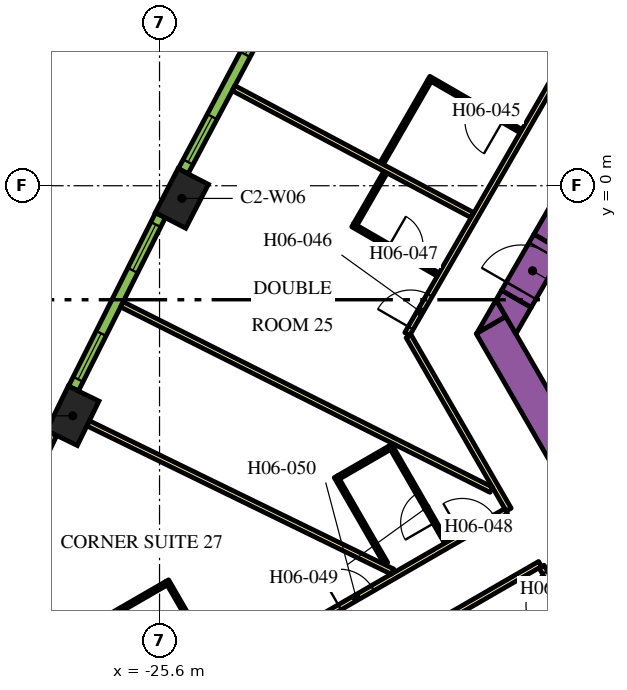
"""IFC4 building model, lengths in metres.
Left out: names, types, materials, properties, quantities, classifications, styles, units other than length and angle.
Written with IfcOpenShell. Run it as: python <this file> out.ifc"""

import sys

from ifc_helpers import new_model, si_unit, direction, frame, frame_2d, origin, origin_2d, place, context, subcontext, project, spatial, polyline, rectangle, outline, extrude, element, fill, save


model = new_model("IFC4")
c1 = context("Model", 3, precision=1e-05, world=origin(), true_north=direction((0.0, 1.0)))
c2 = subcontext(c1, "Body", "Model", "MODEL_VIEW")
j1 = project(units=[si_unit("LENGTHUNIT", "METRE"), si_unit("PLANEANGLEUNIT", "RADIAN")], contexts=[c1])
p1 = place(None, origin())
s1 = spatial("IfcSite", under=j1, at=p1, CompositionType="ELEMENT")
p2 = place(p1, origin())
s2 = spatial("IfcBuilding", under=s1, at=p2, CompositionType="ELEMENT")
p3 = place(p2, frame((0.0, 0.0, 91.5)))
s3 = spatial("IfcBuildingStorey", under=s2, at=p3, CompositionType="ELEMENT", Elevation=91.5)
for number, where, z_axis, x_axis in (
    (1, (-25.012, -0.334, 0.0), (0.0, 0.0, 1.0), (-0.459, -0.888, 0.0)),
    (2, (-27.883, -6.054, 0.0), (0.0, 0.0, 1.0), (-0.438, -0.899, 0.0)),
):
    element("IfcColumn", number, at=place(p3, frame(where, z_axis=z_axis, x_axis=x_axis)), inside=s3, PredefinedType="COLUMN", context=c2, shape_type="SweptSolid", body=[
        extrude(rectangle(XDim=1.3, YDim=0.9, at=origin_2d()), origin(), (0.0, 0.0, 1.0), 3.9),
    ])
p4 = place(p3, frame((-15.36, -1.503, 0.0), z_axis=(0.0, 0.0, 1.0), x_axis=(0.50000389221, 0.866023156604, 0.0)))
e3 = element("IfcWall", 3, at=p4, inside=s3, PredefinedType="SOLIDWALL", context=c2, shape_type="SweptSolid", body=[
    extrude(rectangle(XDim=21.0, YDim=0.9, at=frame_2d((10.5, 0.0))), origin(), (0.0, 0.0, 1.0), 3.9),
])
p5 = place(p3, frame((-12.134, -11.883, 0.0), z_axis=(0.0, 0.0, 1.0), x_axis=(-0.500005339912, 0.866022320763, 0.0)))
e4 = element("IfcWall", 4, at=p5, inside=s3, PredefinedType="SOLIDWALL", context=c2, shape_type="SweptSolid", body=[
    extrude(rectangle(XDim=9.488, YDim=0.9, at=frame_2d((4.744, 0.0))), origin(), (0.0, 0.0, 1.0), 3.9),
])
p6 = place(p3, origin())
e5 = element("IfcWall", 5, at=p6, inside=s3, PredefinedType="SOLIDWALL", context=c2, shape_type="SweptSolid", body=[
    extrude(outline(polyline([(-16.489, -3.44), (-17.251, -3.88), (-16.743, -3.0), (-16.489, -3.44)])), origin(), (0.0, 0.0, 1.0), 3.9),
])
e6 = element("IfcWall", 6, at=p6, inside=s3, PredefinedType="SOLIDWALL", context=c2, shape_type="SweptSolid", body=[
    extrude(outline(polyline([(-15.82, -3.201), (-16.223, -3.9), (-16.743, -3.0), (-16.599, -2.751), (-15.82, -3.201)])), origin(), (0.0, 0.0, 1.0), 3.9),
])
p7 = place(p3, frame((-16.209, -2.976, 0.0), z_axis=(0.0, 0.0, 1.0), x_axis=(0.499954529098, 0.86605165483, 0.0)))
e7 = element("IfcWall", 7, at=p7, inside=s3, PredefinedType="SOLIDWALL", context=c2, shape_type="SweptSolid", body=[
    extrude(rectangle(XDim=1.7, YDim=0.9, at=frame_2d((0.85, 0.0))), origin(), (0.0, 0.0, 1.0), 3.9),
])
p8 = place(p7, frame((0.25, 0.0, 0.0)))
e8 = element("IfcOpeningElement", 8, at=p8, cuts=e7, PredefinedType="OPENING", context=c2, shape_type="SweptSolid", body=[
    extrude(rectangle(XDim=1.2, YDim=2.1, at=frame_2d((0.6, 1.05))), frame((0.0, 0.46, 0.0), z_axis=(0.0, -1.0, 0.0), x_axis=(1.0, 0.0, 0.0)), (0.0, 0.0, 1.0), 0.92),
])
p9 = place(p3, frame((-19.081, -3.9, 0.0), z_axis=(0.0, 0.0, 1.0), x_axis=(0.499998313975, 0.866026377209, 0.0)))
e9 = element("IfcWall", 9, at=p9, inside=s3, PredefinedType="PARTITIONING", context=c2, shape_type="SweptSolid", body=[
    extrude(rectangle(XDim=25.766, YDim=0.15, at=frame_2d((12.883, 0.0))), origin(), (0.0, 0.0, 1.0), 2.75),
])
p10 = place(p9, frame((19.306, 0.0, 0.0)))
e10 = element("IfcOpeningElement", 10, at=p10, cuts=e9, PredefinedType="OPENING", context=c2, shape_type="SweptSolid", body=[
    extrude(rectangle(XDim=1.0, YDim=2.1, at=frame_2d((0.5, 1.05))), frame((0.0, 0.085, 0.0), z_axis=(0.0, -1.0, 0.0), x_axis=(1.0, 0.0, 0.0)), (0.0, 0.0, 1.0), 0.17),
])
p11 = place(p9, frame((18.0, 0.0, 0.0)))
e11 = element("IfcOpeningElement", 11, at=p11, cuts=e9, PredefinedType="OPENING", context=c2, shape_type="SweptSolid", body=[
    extrude(rectangle(XDim=1.0, YDim=2.1, at=frame_2d((0.5, 1.05))), frame((0.0, 0.085, 0.0), z_axis=(0.0, -1.0, 0.0), x_axis=(1.0, 0.0, 0.0)), (0.0, 0.0, 1.0), 0.17),
])
p12 = place(p9, frame((10.874, 0.0, 0.0)))
e12 = element("IfcOpeningElement", 12, at=p12, cuts=e9, PredefinedType="OPENING", context=c2, shape_type="SweptSolid", body=[
    extrude(rectangle(XDim=0.9, YDim=2.1, at=frame_2d((0.45, 1.05))), frame((0.0, 0.085, 0.0), z_axis=(0.0, -1.0, 0.0), x_axis=(1.0, 0.0, 0.0)), (0.0, 0.0, 1.0), 0.17),
])
p13 = place(p9, frame((8.548, 0.0, 0.0)))
e13 = element("IfcOpeningElement", 13, at=p13, cuts=e9, PredefinedType="OPENING", context=c2, shape_type="SweptSolid", body=[
    extrude(rectangle(XDim=1.1, YDim=2.1, at=frame_2d((0.55, 1.05))), frame((0.0, 0.085, 0.0), z_axis=(0.0, -1.0, 0.0), x_axis=(1.0, 0.0, 0.0)), (0.0, 0.0, 1.0), 0.17),
])
p14 = place(p9, frame((0.18, 0.0, 0.0)))
e14 = element("IfcOpeningElement", 14, at=p14, cuts=e9, PredefinedType="OPENING", context=c2, shape_type="SweptSolid", body=[
    extrude(rectangle(XDim=1.0, YDim=2.1, at=frame_2d((0.5, 1.05))), frame((0.0, 0.085, 0.0), z_axis=(0.0, -1.0, 0.0), x_axis=(1.0, 0.0, 0.0)), (0.0, 0.0, 1.0), 0.17),
])
p15 = place(p3, frame((-16.412, -8.523, 0.0), z_axis=(0.0, 0.0, 1.0), x_axis=(-0.500001929737, 0.866024289647, 0.0)))
e15 = element("IfcWall", 15, at=p15, inside=s3, PredefinedType="PARTITIONING", context=c2, shape_type="SweptSolid", body=[
    extrude(rectangle(XDim=5.268, YDim=0.15, at=frame_2d((2.634, 0.0))), origin(), (0.0, 0.0, 1.0), 2.75),
])
p16 = place(p3, frame((-28.211, -15.335, 0.0), z_axis=(0.0, 0.0, 1.0), x_axis=(0.866025884867, 0.49999916674, 0.0)))
e16 = element("IfcWall", 16, at=p16, inside=s3, PredefinedType="PARTITIONING", context=c2, shape_type="SweptSolid", body=[
    extrude(rectangle(XDim=13.543, YDim=0.15, at=frame_2d((6.772, 0.0))), origin(), (0.0, 0.0, 1.0), 2.75),
])
p17 = place(p16, frame((12.214, 0.0, 0.0)))
e17 = element("IfcOpeningElement", 17, at=p17, cuts=e16, PredefinedType="OPENING", context=c2, shape_type="SweptSolid", body=[
    extrude(rectangle(XDim=1.0, YDim=2.1, at=frame_2d((0.5, 1.05))), frame((0.0, 0.085, 0.0), z_axis=(0.0, -1.0, 0.0), x_axis=(1.0, 0.0, 0.0)), (0.0, 0.0, 1.0), 0.17),
])
p18 = place(p16, frame((8.488, 0.0, 0.0)))
e18 = element("IfcOpeningElement", 18, at=p18, cuts=e16, PredefinedType="OPENING", context=c2, shape_type="SweptSolid", body=[
    extrude(rectangle(XDim=1.0, YDim=2.1, at=frame_2d((0.5, 1.05))), frame((0.0, 0.085, 0.0), z_axis=(0.0, -1.0, 0.0), x_axis=(1.0, 0.0, 0.0)), (0.0, 0.0, 1.0), 0.17),
])
p19 = place(p3, frame((-15.587, -9.952, 0.0), z_axis=(0.0, 0.0, 1.0), x_axis=(-0.866017869832, -0.500013048961, 0.0)))
e19 = element("IfcWall", 19, at=p19, inside=s3, PredefinedType="PARTITIONING", context=c2, shape_type="SweptSolid", body=[
    extrude(rectangle(XDim=13.624, YDim=0.15, at=frame_2d((6.812, 0.0))), origin(), (0.0, 0.0, 1.0), 2.75),
])
p20 = place(p19, frame((4.134, 0.0, 0.0)))
e20 = element("IfcOpeningElement", 20, at=p20, cuts=e19, PredefinedType="OPENING", context=c2, shape_type="SweptSolid", body=[
    extrude(rectangle(XDim=1.0, YDim=2.1, at=frame_2d((0.5, 1.05))), frame((0.0, 0.085, 0.0), z_axis=(0.0, -1.0, 0.0), x_axis=(1.0, 0.0, 0.0)), (0.0, 0.0, 1.0), 0.17),
])
p21 = place(p3, frame((-12.918, -14.575, 0.0), z_axis=(0.0, 0.0, 1.0), x_axis=(-0.500009150678, 0.866020120573, 0.0)))
e21 = element("IfcWall", 21, at=p21, inside=s3, PredefinedType="PARTITIONING", context=c2, shape_type="SweptSolid", body=[
    extrude(rectangle(XDim=5.258, YDim=0.15, at=frame_2d((2.629, 0.0))), origin(), (0.0, 0.0, 1.0), 2.75),
])
p22 = place(p21, frame((4.078, 0.0, 0.0)))
e22 = element("IfcOpeningElement", 22, at=p22, cuts=e21, PredefinedType="OPENING", context=c2, shape_type="SweptSolid", body=[
    extrude(rectangle(XDim=1.0, YDim=2.1, at=frame_2d((0.5, 1.05))), frame((0.0, 0.085, 0.0), z_axis=(0.0, -1.0, 0.0), x_axis=(1.0, 0.0, 0.0)), (0.0, 0.0, 1.0), 0.17),
])
p23 = place(p3, frame((-27.479, -6.251, 0.0), z_axis=(0.0, 0.0, 1.0), x_axis=(0.898945877276, -0.438059710231, 0.0)))
e23 = element("IfcWall", 23, at=p23, inside=s3, PredefinedType="PARTITIONING", context=c2, shape_type="SweptSolid", body=[
    extrude(rectangle(XDim=8.909, YDim=0.15, at=frame_2d((4.455, 0.0))), origin(), (0.0, 0.0, 1.0), 2.75),
])
p24 = place(p3, frame((-23.652, 2.567, 0.0), z_axis=(0.0, 0.0, 1.0), x_axis=(0.883019237957, -0.469336793144, 0.0)))
e24 = element("IfcWall", 24, at=p24, inside=s3, PredefinedType="PARTITIONING", context=c2, shape_type="SweptSolid", body=[
    extrude(rectangle(XDim=7.111, YDim=0.15, at=frame_2d((3.555, 0.0))), origin(), (0.0, 0.0, 1.0), 2.75),
])
p25 = place(p3, frame((-26.591, -3.122, 0.0), z_axis=(0.0, 0.0, 1.0), x_axis=(0.893766213273, -0.448533115847, 0.0)))
e25 = element("IfcWall", 25, at=p25, inside=s3, PredefinedType="PARTITIONING", context=c2, shape_type="SweptSolid", body=[
    extrude(rectangle(XDim=10.875, YDim=0.15, at=frame_2d((5.438, 0.0))), origin(), (0.0, 0.0, 1.0), 2.75),
])
p26 = place(p3, frame((-16.087, 1.436, 0.0), z_axis=(0.0, 0.0, 1.0), x_axis=(-0.866034573852, 0.49998411664, 0.0)))
e26 = element("IfcWall", 26, at=p26, inside=s3, PredefinedType="PARTITIONING", context=c2, shape_type="SweptSolid", body=[
    extrude(rectangle(XDim=2.8, YDim=0.1, at=frame_2d((1.4, 0.0))), origin(), (0.0, 0.0, 1.0), 2.75),
])
p27 = place(p26, frame((0.55, 0.0, 0.0)))
e27 = element("IfcOpeningElement", 27, at=p27, cuts=e26, PredefinedType="OPENING", context=c2, shape_type="SweptSolid", body=[
    extrude(rectangle(XDim=1.0, YDim=2.1, at=frame_2d((0.5, 1.05))), frame((0.0, 0.06, 0.0), z_axis=(0.0, -1.0, 0.0), x_axis=(1.0, 0.0, 0.0)), (0.0, 0.0, 1.0), 0.12),
])
p28 = place(p3, frame((-18.494, 2.768, 0.0), z_axis=(0.0, 0.0, 1.0), x_axis=(-0.500004791531, -0.866022637375, 0.0)))
e28 = element("IfcWall", 28, at=p28, inside=s3, PredefinedType="PARTITIONING", context=c2, shape_type="SweptSolid", body=[
    extrude(rectangle(XDim=2.52, YDim=0.1, at=frame_2d((1.26, 0.0))), origin(), (0.0, 0.0, 1.0), 2.75),
])
p29 = place(p3, frame((-20.518, -1.037, 0.0), z_axis=(0.0, 0.0, 1.0), x_axis=(0.866021400173, -0.500006934395, 0.0)))
e29 = element("IfcWall", 29, at=p29, inside=s3, PredefinedType="PARTITIONING", context=c2, shape_type="SweptSolid", body=[
    extrude(rectangle(XDim=2.6, YDim=0.1, at=frame_2d((1.3, 0.0))), origin(), (0.0, 0.0, 1.0), 2.75),
])
p30 = place(p29, frame((1.1, 0.0, 0.0)))
e30 = element("IfcOpeningElement", 30, at=p30, cuts=e29, PredefinedType="OPENING", context=c2, shape_type="SweptSolid", body=[
    extrude(rectangle(XDim=0.9, YDim=2.1, at=frame_2d((0.45, 1.05))), frame((0.0, 0.06, 0.0), z_axis=(0.0, -1.0, 0.0), x_axis=(1.0, 0.0, 0.0)), (0.0, 0.0, 1.0), 0.12),
])
p31 = place(p3, frame((-20.449, -1.019, 0.0), z_axis=(0.0, 0.0, 1.0), x_axis=(0.500061319399, 0.865989998118, 0.0)))
e31 = element("IfcWall", 31, at=p31, inside=s3, PredefinedType="PARTITIONING", context=c2, shape_type="SweptSolid", body=[
    extrude(rectangle(XDim=1.58, YDim=0.1, at=frame_2d((0.79, 0.0))), origin(), (0.0, 0.0, 1.0), 2.75),
])
p32 = place(p3, frame((-18.055, -9.385, 0.0), z_axis=(0.0, 0.0, 1.0), x_axis=(-0.499939757307, 0.866060182126, 0.0)))
e32 = element("IfcWall", 32, at=p32, inside=s3, PredefinedType="PARTITIONING", context=c2, shape_type="SweptSolid", body=[
    extrude(rectangle(XDim=2.95, YDim=0.1, at=frame_2d((1.475, 0.0))), origin(), (0.0, 0.0, 1.0), 2.75),
])
p33 = place(p32, frame((0.6, 0.0, 0.0)))
e33 = element("IfcOpeningElement", 33, at=p33, cuts=e32, PredefinedType="OPENING", context=c2, shape_type="SweptSolid", body=[
    extrude(rectangle(XDim=0.9, YDim=2.1, at=frame_2d((0.45, 1.05))), frame((0.0, 0.06, 0.0), z_axis=(0.0, -1.0, 0.0), x_axis=(1.0, 0.0, 0.0)), (0.0, 0.0, 1.0), 0.12),
])
p34 = place(p3, frame((-19.549, -6.898, 0.0), z_axis=(0.0, 0.0, 1.0), x_axis=(-0.866043940782, -0.499967891604, 0.0)))
e34 = element("IfcWall", 34, at=p34, inside=s3, PredefinedType="PARTITIONING", context=c2, shape_type="SweptSolid", body=[
    extrude(rectangle(XDim=1.55, YDim=0.1, at=frame_2d((0.775, 0.0))), origin(), (0.0, 0.0, 1.0), 2.75),
])
p35 = place(p3, frame((-19.639, -9.941, 0.0), z_axis=(0.0, 0.0, 1.0), x_axis=(-0.499938597367, 0.866060851709, 0.0)))
e35 = element("IfcWall", 35, at=p35, inside=s3, PredefinedType="PARTITIONING", context=c2, shape_type="SweptSolid", body=[
    extrude(rectangle(XDim=2.64, YDim=0.1, at=frame_2d((1.32, 0.0))), origin(), (0.0, 0.0, 1.0), 2.75),
])
p36 = place(p3, frame((-24.004, -12.82, 0.0), z_axis=(0.0, 0.0, 1.0), x_axis=(-0.500011755427, 0.866018616679, 0.0)))
e36 = element("IfcWall", 36, at=p36, inside=s3, PredefinedType="PARTITIONING", context=c2, shape_type="SweptSolid", body=[
    extrude(rectangle(XDim=2.8, YDim=0.1, at=frame_2d((1.4, 0.0))), origin(), (0.0, 0.0, 1.0), 2.75),
])
p37 = place(p36, frame((0.6, 0.0, 0.0)))
e37 = element("IfcOpeningElement", 37, at=p37, cuts=e36, PredefinedType="OPENING", context=c2, shape_type="SweptSolid", body=[
    extrude(rectangle(XDim=0.9, YDim=2.1, at=frame_2d((0.45, 1.05))), frame((0.0, 0.06, 0.0), z_axis=(0.0, -1.0, 0.0), x_axis=(1.0, 0.0, 0.0)), (0.0, 0.0, 1.0), 0.12),
])
p38 = place(p3, frame((-25.422, -10.463, 0.0), z_axis=(0.0, 0.0, 1.0), x_axis=(-0.866024647952, -0.500001309137, 0.0)))
e38 = element("IfcWall", 38, at=p38, inside=s3, PredefinedType="PARTITIONING", context=c2, shape_type="SweptSolid", body=[
    extrude(rectangle(XDim=2.4, YDim=0.1, at=frame_2d((1.2, 0.0))), origin(), (0.0, 0.0, 1.0), 2.75),
])
p39 = place(p3, frame((-22.583, 4.887, 0.0), z_axis=(0.0, 0.0, 1.0), x_axis=(-0.469323203119, -0.883026461106, 0.0)))
e39 = element("IfcWall", 39, at=p39, inside=s3, PredefinedType="SOLIDWALL", context=c2, shape_type="SweptSolid", body=[
    extrude(rectangle(XDim=5.101, YDim=0.29, at=frame_2d((2.55, 0.0))), origin(), (0.0, 0.0, 1.0), 3.65),
])
p40 = place(p39, frame((0.273, 0.0, 0.9)))
e40 = element("IfcOpeningElement", 40, at=p40, cuts=e39, PredefinedType="OPENING", context=c2, shape_type="SweptSolid", body=[
    extrude(rectangle(XDim=1.35, YDim=2.15, at=frame_2d((0.675, 1.075))), frame((0.0, 0.155, 0.0), z_axis=(0.0, -1.0, 0.0), x_axis=(1.0, 0.0, 0.0)), (0.0, 0.0, 1.0), 0.31),
])
p41 = place(p39, frame((3.478, 0.0, 0.9)))
e41 = element("IfcOpeningElement", 41, at=p41, cuts=e39, PredefinedType="OPENING", context=c2, shape_type="SweptSolid", body=[
    extrude(rectangle(XDim=1.35, YDim=2.15, at=frame_2d((0.675, 1.075))), frame((0.0, 0.155, 0.0), z_axis=(0.0, -1.0, 0.0), x_axis=(1.0, 0.0, 0.0)), (0.0, 0.0, 1.0), 0.31),
])
p42 = place(p3, frame((-25.576, -0.778, 0.0), z_axis=(0.0, 0.0, 1.0), x_axis=(-0.448534297211, -0.893765620409, 0.0)))
e42 = element("IfcWall", 42, at=p42, inside=s3, PredefinedType="SOLIDWALL", context=c2, shape_type="SweptSolid", body=[
    extrude(rectangle(XDim=5.1, YDim=0.29, at=frame_2d((2.55, 0.0))), origin(), (0.0, 0.0, 1.0), 3.65),
])
p43 = place(p42, frame((0.272, 0.0, 0.9)))
e43 = element("IfcOpeningElement", 43, at=p43, cuts=e42, PredefinedType="OPENING", context=c2, shape_type="SweptSolid", body=[
    extrude(rectangle(XDim=1.35, YDim=2.15, at=frame_2d((0.675, 1.075))), frame((0.0, 0.155, 0.0), z_axis=(0.0, -1.0, 0.0), x_axis=(1.0, 0.0, 0.0)), (0.0, 0.0, 1.0), 0.31),
])
p44 = place(p42, frame((3.478, 0.0, 0.9)))
e44 = element("IfcOpeningElement", 44, at=p44, cuts=e42, PredefinedType="OPENING", context=c2, shape_type="SweptSolid", body=[
    extrude(rectangle(XDim=1.35, YDim=2.15, at=frame_2d((0.675, 1.075))), frame((0.0, 0.155, 0.0), z_axis=(0.0, -1.0, 0.0), x_axis=(1.0, 0.0, 0.0)), (0.0, 0.0, 1.0), 0.31),
])
p45 = place(p3, frame((-28.436, -6.511, 0.0), z_axis=(0.0, 0.0, 1.0), x_axis=(-0.427543726596, -0.903994669148, 0.0)))
e45 = element("IfcWall", 45, at=p45, inside=s3, PredefinedType="SOLIDWALL", context=c2, shape_type="SweptSolid", body=[
    extrude(rectangle(XDim=5.107, YDim=0.29, at=frame_2d((2.553, 0.0))), origin(), (0.0, 0.0, 1.0), 3.65),
])
p46 = place(p45, frame((0.285, 0.0, 0.9)))
e46 = element("IfcOpeningElement", 46, at=p46, cuts=e45, PredefinedType="OPENING", context=c2, shape_type="SweptSolid", body=[
    extrude(rectangle(XDim=1.35, YDim=2.15, at=frame_2d((0.675, 1.075))), frame((0.0, 0.155, 0.0), z_axis=(0.0, -1.0, 0.0), x_axis=(1.0, 0.0, 0.0)), (0.0, 0.0, 1.0), 0.31),
])
p47 = place(p45, frame((3.516, 0.0, 0.9)))
e47 = element("IfcOpeningElement", 47, at=p47, cuts=e45, PredefinedType="OPENING", context=c2, shape_type="SweptSolid", body=[
    extrude(rectangle(XDim=1.35, YDim=2.15, at=frame_2d((0.675, 1.075))), frame((0.0, 0.155, 0.0), z_axis=(0.0, -1.0, 0.0), x_axis=(1.0, 0.0, 0.0)), (0.0, 0.0, 1.0), 0.31),
])
p48 = place(p8, origin())
e48 = element("IfcDoor", 48, at=p48, inside=s3, OperationType="SINGLE_SWING_LEFT", PredefinedType="DOOR", context=c2, shape_type="SweptSolid", body=[
    extrude(rectangle(XDim=1.2, YDim=2.1, at=frame_2d((0.6, 1.05))), frame((0.0, 0.025, 0.0), z_axis=(0.0, -1.0, 0.0), x_axis=(1.0, 0.0, 0.0)), (0.0, 0.0, 1.0), 0.05),
])
fill(e8, e48)
p49 = place(p22, origin())
e49 = element("IfcDoor", 49, at=p49, inside=s3, OperationType="SINGLE_SWING_RIGHT", PredefinedType="DOOR", context=c2, shape_type="SweptSolid", body=[
    extrude(rectangle(XDim=1.0, YDim=2.1, at=frame_2d((0.5, 1.05))), frame((0.0, 0.025, 0.0), z_axis=(0.0, -1.0, 0.0), x_axis=(1.0, 0.0, 0.0)), (0.0, 0.0, 1.0), 0.05),
])
fill(e22, e49)
p50 = place(p27, origin())
e50 = element("IfcDoor", 50, at=p50, inside=s3, OperationType="SINGLE_SWING_RIGHT", PredefinedType="DOOR", context=c2, shape_type="SweptSolid", body=[
    extrude(rectangle(XDim=1.0, YDim=2.1, at=frame_2d((0.5, 1.05))), frame((0.0, 0.025, 0.0), z_axis=(0.0, -1.0, 0.0), x_axis=(1.0, 0.0, 0.0)), (0.0, 0.0, 1.0), 0.05),
])
fill(e27, e50)
p51 = place(p14, origin())
e51 = element("IfcDoor", 51, at=p51, inside=s3, OperationType="SINGLE_SWING_LEFT", PredefinedType="DOOR", context=c2, shape_type="SweptSolid", body=[
    extrude(rectangle(XDim=1.0, YDim=2.1, at=frame_2d((0.5, 1.05))), frame((0.0, 0.025, 0.0), z_axis=(0.0, -1.0, 0.0), x_axis=(1.0, 0.0, 0.0)), (0.0, 0.0, 1.0), 0.05),
])
fill(e14, e51)
p52 = place(p30, origin())
e52 = element("IfcDoor", 52, at=p52, inside=s3, OperationType="SINGLE_SWING_LEFT", PredefinedType="DOOR", context=c2, shape_type="SweptSolid", body=[
    extrude(rectangle(XDim=0.9, YDim=2.1, at=frame_2d((0.45, 1.05))), frame((0.0, 0.025, 0.0), z_axis=(0.0, -1.0, 0.0), x_axis=(1.0, 0.0, 0.0)), (0.0, 0.0, 1.0), 0.05),
])
fill(e30, e52)
p53 = place(p17, origin())
e53 = element("IfcDoor", 53, at=p53, inside=s3, OperationType="SINGLE_SWING_RIGHT", PredefinedType="DOOR", context=c2, shape_type="SweptSolid", body=[
    extrude(rectangle(XDim=1.0, YDim=2.1, at=frame_2d((0.5, 1.05))), frame((0.0, 0.025, 0.0), z_axis=(0.0, -1.0, 0.0), x_axis=(1.0, 0.0, 0.0)), (0.0, 0.0, 1.0), 0.05),
])
fill(e17, e53)
p54 = place(p33, origin())
e54 = element("IfcDoor", 54, at=p54, inside=s3, OperationType="SINGLE_SWING_LEFT", PredefinedType="DOOR", context=c2, shape_type="SweptSolid", body=[
    extrude(rectangle(XDim=0.9, YDim=2.1, at=frame_2d((0.45, 1.05))), frame((0.0, 0.025, 0.0), z_axis=(0.0, -1.0, 0.0), x_axis=(1.0, 0.0, 0.0)), (0.0, 0.0, 1.0), 0.05),
])
fill(e33, e54)
p55 = place(p18, origin())
e55 = element("IfcDoor", 55, at=p55, inside=s3, OperationType="SINGLE_SWING_RIGHT", PredefinedType="DOOR", context=c2, shape_type="SweptSolid", body=[
    extrude(rectangle(XDim=1.0, YDim=2.1, at=frame_2d((0.5, 1.05))), frame((0.0, 0.025, 0.0), z_axis=(0.0, -1.0, 0.0), x_axis=(1.0, 0.0, 0.0)), (0.0, 0.0, 1.0), 0.05),
])
fill(e18, e55)
p56 = place(p40, origin())
e56 = element("IfcWindow", 56, at=p56, inside=s3, PartitioningType="DOUBLE_PANEL_VERTICAL", PredefinedType="WINDOW", context=c2, shape_type="SweptSolid", body=[
    extrude(rectangle(XDim=1.35, YDim=2.15, at=frame_2d((0.675, 1.075))), frame((0.0, 0.015, 0.0), z_axis=(0.0, -1.0, 0.0), x_axis=(1.0, 0.0, 0.0)), (0.0, 0.0, 1.0), 0.06),
])
fill(e40, e56)
p57 = place(p41, origin())
e57 = element("IfcWindow", 57, at=p57, inside=s3, PartitioningType="DOUBLE_PANEL_VERTICAL", PredefinedType="WINDOW", context=c2, shape_type="SweptSolid", body=[
    extrude(rectangle(XDim=1.35, YDim=2.15, at=frame_2d((0.675, 1.075))), frame((0.0, 0.015, 0.0), z_axis=(0.0, -1.0, 0.0), x_axis=(1.0, 0.0, 0.0)), (0.0, 0.0, 1.0), 0.06),
])
fill(e41, e57)
p58 = place(p43, origin())
e58 = element("IfcWindow", 58, at=p58, inside=s3, PartitioningType="DOUBLE_PANEL_VERTICAL", PredefinedType="WINDOW", context=c2, shape_type="SweptSolid", body=[
    extrude(rectangle(XDim=1.35, YDim=2.15, at=frame_2d((0.675, 1.075))), frame((0.0, 0.015, 0.0), z_axis=(0.0, -1.0, 0.0), x_axis=(1.0, 0.0, 0.0)), (0.0, 0.0, 1.0), 0.06),
])
fill(e43, e58)
p59 = place(p44, origin())
e59 = element("IfcWindow", 59, at=p59, inside=s3, PartitioningType="DOUBLE_PANEL_VERTICAL", PredefinedType="WINDOW", context=c2, shape_type="SweptSolid", body=[
    extrude(rectangle(XDim=1.35, YDim=2.15, at=frame_2d((0.675, 1.075))), frame((0.0, 0.015, 0.0), z_axis=(0.0, -1.0, 0.0), x_axis=(1.0, 0.0, 0.0)), (0.0, 0.0, 1.0), 0.06),
])
fill(e44, e59)
save(model, sys.argv[1])
